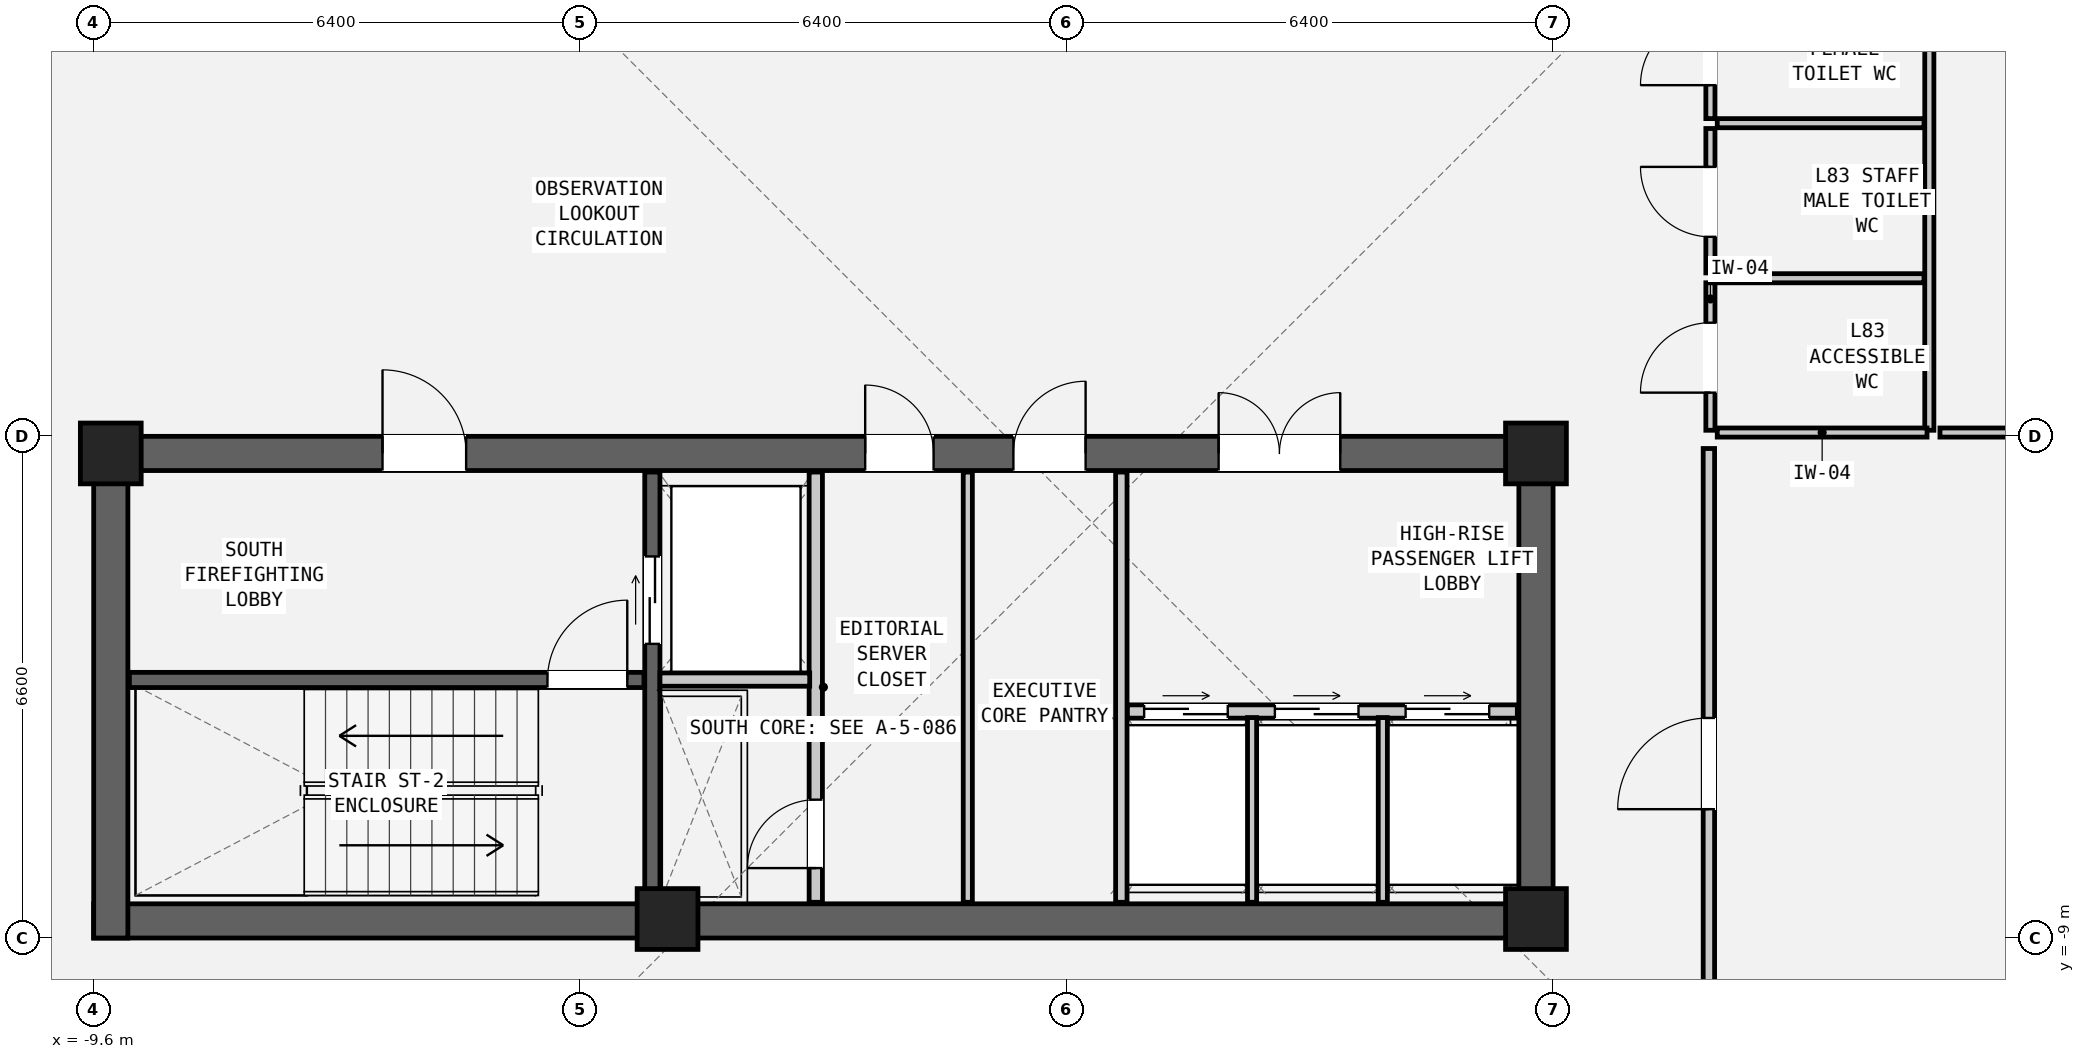
"""IFC4 building model, lengths in metres.
Left out: names, types, materials, properties, quantities, classifications, styles, units other than length and angle.
Written with IfcOpenShell. Run it as: python <this file> out.ifc"""

import sys

from ifc_helpers import new_model, si_unit, direction, frame, frame_2d, origin, origin_2d, place, context, subcontext, project, spatial, rectangle, extrude, element, fill, save


model = new_model("IFC4")
c1 = context("Model", 3, precision=1e-05, world=origin(), true_north=direction((0.0, 1.0)))
c2 = subcontext(c1, "Body", "Model", "MODEL_VIEW")
j1 = project(units=[si_unit("LENGTHUNIT", "METRE"), si_unit("PLANEANGLEUNIT", "RADIAN")], contexts=[c1])
p1 = place(None, origin())
s1 = spatial("IfcSite", under=j1, at=p1, CompositionType="ELEMENT")
p2 = place(p1, origin())
s2 = spatial("IfcBuilding", under=s1, at=p2, CompositionType="ELEMENT")
p3 = place(p2, frame((0.0, 0.0, 280.55)))
s3 = spatial("IfcBuildingStorey", under=s2, at=p3, CompositionType="ELEMENT", Elevation=280.55)
p4 = place(p3, frame((-9.6, -8.775, 0.0), z_axis=(0.0, 0.0, 1.0), x_axis=(1.0, 0.0, 0.0)))
e1 = element("IfcWall", 1, at=p4, inside=s3, PredefinedType="SHEAR", context=c2, shape_type="SweptSolid", body=[
    extrude(rectangle(XDim=19.2, YDim=0.45, at=frame_2d((9.6, 0.0))), origin(), (0.0, 0.0, 1.0), 4.35),
])
p5 = place(p3, frame((-9.6, -2.625, 0.0), z_axis=(0.0, 0.0, 1.0), x_axis=(1.0, 0.0, 0.0)))
e2 = element("IfcWall", 2, at=p5, inside=s3, PredefinedType="SHEAR", context=c2, shape_type="SweptSolid", body=[
    extrude(rectangle(XDim=19.2, YDim=0.45, at=frame_2d((9.6, 0.0))), origin(), (0.0, 0.0, 1.0), 4.35),
])
p6 = place(p5, frame((3.8, 0.0, 0.0)))
e3 = element("IfcOpeningElement", 3, at=p6, cuts=e2, PredefinedType="OPENING", context=c2, shape_type="SweptSolid", body=[
    extrude(rectangle(XDim=1.1, YDim=2.08, at=frame_2d((0.55, 1.04))), frame((0.0, 0.237, 0.0), z_axis=(0.0, -1.0, 0.0), x_axis=(1.0, 0.0, 0.0)), (0.0, 0.0, 1.0), 0.474),
])
p7 = place(p5, frame((10.15, 0.0, 0.0)))
e4 = element("IfcOpeningElement", 4, at=p7, cuts=e2, PredefinedType="OPENING", context=c2, shape_type="SweptSolid", body=[
    extrude(rectangle(XDim=0.9, YDim=2.05, at=frame_2d((0.45, 1.025))), frame((0.0, 0.237, 0.0), z_axis=(0.0, -1.0, 0.0), x_axis=(1.0, 0.0, 0.0)), (0.0, 0.0, 1.0), 0.474),
])
p8 = place(p5, frame((12.1, 0.0, 0.0)))
e5 = element("IfcOpeningElement", 5, at=p8, cuts=e2, PredefinedType="OPENING", context=c2, shape_type="SweptSolid", body=[
    extrude(rectangle(XDim=0.95, YDim=2.1, at=frame_2d((0.475, 1.05))), frame((0.0, 0.237, 0.0), z_axis=(0.0, -1.0, 0.0), x_axis=(1.0, 0.0, 0.0)), (0.0, 0.0, 1.0), 0.474),
])
p9 = place(p5, frame((14.8, 0.0, 0.0)))
e6 = element("IfcOpeningElement", 6, at=p9, cuts=e2, PredefinedType="OPENING", context=c2, shape_type="SweptSolid", body=[
    extrude(rectangle(XDim=1.6, YDim=2.12, at=frame_2d((0.8, 1.06))), frame((0.0, 0.237, 0.0), z_axis=(0.0, -1.0, 0.0), x_axis=(1.0, 0.0, 0.0)), (0.0, 0.0, 1.0), 0.474),
])
for number, where, z_axis, x_axis in (
    (7, (-9.375, -9.0, 0.0), (0.0, 0.0, 1.0), (0.0, 1.0, 0.0)),
    (8, (9.375, -9.0, 0.0), (0.0, 0.0, 1.0), (0.0, 1.0, 0.0)),
):
    element("IfcWall", number, at=place(p3, frame(where, z_axis=z_axis, x_axis=x_axis)), inside=s3, PredefinedType="SHEAR", context=c2, shape_type="SweptSolid", body=[
        extrude(rectangle(XDim=6.6, YDim=0.45, at=frame_2d((3.3, 0.0))), origin(), (0.0, 0.0, 1.0), 4.35),
    ])
for number, where, z_axis, x_axis in (
    (9, (-9.375, -2.625, 0.0), (0.0, 0.0, 1.0), (1.0, 0.0, 0.0)),
    (10, (9.375, -2.625, 0.0), (0.0, 0.0, 1.0), (1.0, 0.0, 0.0)),
    (11, (-2.05, -8.75, 0.0), (0.0, 0.0, 1.0), (1.0, 0.0, 0.0)),
    (12, (9.375, -8.75, 0.0), (0.0, 0.0, 1.0), (1.0, 0.0, 0.0)),
):
    element("IfcColumn", number, at=place(p3, frame(where, z_axis=z_axis, x_axis=x_axis)), inside=s3, PredefinedType="COLUMN", context=c2, shape_type="SweptSolid", body=[
        extrude(rectangle(XDim=0.8, YDim=0.8, at=origin_2d()), origin(), (0.0, 0.0, 1.0), 4.35),
    ])
p10 = place(p3, frame((-9.13, -5.605, 0.0), z_axis=(0.0, 0.0, 1.0), x_axis=(1.0, 0.0, 0.0)))
e13 = element("IfcWall", 13, at=p10, inside=s3, PredefinedType="SHEAR", context=c2, shape_type="SweptSolid", body=[
    extrude(rectangle(XDim=6.77, YDim=0.2, at=frame_2d((3.385, 0.0))), origin(), (0.0, 0.0, 1.0), 4.07),
])
p11 = place(p10, frame((5.5, 0.0, 0.0)))
e14 = element("IfcOpeningElement", 14, at=p11, cuts=e13, PredefinedType="OPENING", context=c2, shape_type="SweptSolid", body=[
    extrude(rectangle(XDim=1.05, YDim=2.08, at=frame_2d((0.525, 1.04))), frame((0.0, 0.112, 0.0), z_axis=(0.0, -1.0, 0.0), x_axis=(1.0, 0.0, 0.0)), (0.0, 0.0, 1.0), 0.224),
])
p12 = place(p3, frame((-2.25, -8.53, 0.0), z_axis=(0.0, 0.0, 1.0), x_axis=(0.0, 1.0, 0.0)))
e15 = element("IfcWall", 15, at=p12, inside=s3, PredefinedType="SHEAR", context=c2, shape_type="SweptSolid", body=[
    extrude(rectangle(XDim=5.66, YDim=0.2, at=frame_2d((2.83, 0.0))), origin(), (0.0, 0.0, 1.0), 4.07),
])
p13 = place(p12, frame((3.4, 0.0, 0.0)))
e16 = element("IfcOpeningElement", 16, at=p13, cuts=e15, PredefinedType="OPENING", context=c2, shape_type="SweptSolid", body=[
    extrude(rectangle(XDim=1.15, YDim=2.08, at=frame_2d((0.575, 1.04))), frame((0.0, 0.112, 0.0), z_axis=(0.0, -1.0, 0.0), x_axis=(1.0, 0.0, 0.0)), (0.0, 0.0, 1.0), 0.224),
])
p14 = place(p3, frame((-0.1, -8.53, 0.0), z_axis=(0.0, 0.0, 1.0), x_axis=(0.0, 1.0, 0.0)))
e17 = element("IfcWall", 17, at=p14, inside=s3, PredefinedType="PARTITIONING", context=c2, shape_type="SweptSolid", body=[
    extrude(rectangle(XDim=5.66, YDim=0.175, at=frame_2d((2.83, 0.0))), origin(), (0.0, 0.0, 1.0), 4.07),
])
p15 = place(p14, frame((0.45, 0.0, 0.0)))
e18 = element("IfcOpeningElement", 18, at=p15, cuts=e17, PredefinedType="OPENING", context=c2, shape_type="SweptSolid", body=[
    extrude(rectangle(XDim=0.9, YDim=2.05, at=frame_2d((0.45, 1.025))), frame((0.0, 0.1, 0.0), z_axis=(0.0, -1.0, 0.0), x_axis=(1.0, 0.0, 0.0)), (0.0, 0.0, 1.0), 0.199),
])
p16 = place(p3, frame((-2.15, -5.6, 0.0), z_axis=(0.0, 0.0, 1.0), x_axis=(1.0, 0.0, 0.0)))
e19 = element("IfcWall", 19, at=p16, inside=s3, PredefinedType="PARTITIONING", context=c2, shape_type="SweptSolid", body=[
    extrude(rectangle(XDim=1.97, YDim=0.175, at=frame_2d((0.985, 0.0))), origin(), (0.0, 0.0, 1.0), 4.07),
])
p17 = place(p3, frame((3.92, -8.53, 0.0), z_axis=(0.0, 0.0, 1.0), x_axis=(0.0, 1.0, 0.0)))
e20 = element("IfcWall", 20, at=p17, inside=s3, PredefinedType="PARTITIONING", context=c2, shape_type="SweptSolid", body=[
    extrude(rectangle(XDim=5.66, YDim=0.15, at=frame_2d((2.83, 0.0))), origin(), (0.0, 0.0, 1.0), 4.07),
])
p18 = place(p3, frame((1.9, -8.53, 0.0), z_axis=(0.0, 0.0, 1.0), x_axis=(0.0, 1.0, 0.0)))
e21 = element("IfcWall", 21, at=p18, inside=s3, PredefinedType="PARTITIONING", context=c2, shape_type="SweptSolid", body=[
    extrude(rectangle(XDim=5.66, YDim=0.12, at=frame_2d((2.83, 0.0))), origin(), (0.0, 0.0, 1.0), 4.07),
])
p19 = place(p3, frame((4.0, -6.02, 0.0), z_axis=(0.0, 0.0, 1.0), x_axis=(1.0, 0.0, 0.0)))
e22 = element("IfcWall", 22, at=p19, inside=s3, PredefinedType="PARTITIONING", context=c2, shape_type="SweptSolid", body=[
    extrude(rectangle(XDim=5.13, YDim=0.175, at=frame_2d((2.565, 0.0))), origin(), (0.0, 0.0, 1.0), 4.07),
])
p20 = place(p19, frame((0.22, 0.0, 0.0)))
e23 = element("IfcOpeningElement", 23, at=p20, cuts=e22, PredefinedType="OPENING", context=c2, shape_type="SweptSolid", body=[
    extrude(rectangle(XDim=1.1, YDim=2.06, at=frame_2d((0.55, 1.03))), frame((0.0, 0.1, 0.0), z_axis=(0.0, -1.0, 0.0), x_axis=(1.0, 0.0, 0.0)), (0.0, 0.0, 1.0), 0.199),
])
p21 = place(p19, frame((1.94, 0.0, 0.0)))
e24 = element("IfcOpeningElement", 24, at=p21, cuts=e22, PredefinedType="OPENING", context=c2, shape_type="SweptSolid", body=[
    extrude(rectangle(XDim=1.1, YDim=2.06, at=frame_2d((0.55, 1.03))), frame((0.0, 0.1, 0.0), z_axis=(0.0, -1.0, 0.0), x_axis=(1.0, 0.0, 0.0)), (0.0, 0.0, 1.0), 0.199),
])
p22 = place(p19, frame((3.66, 0.0, 0.0)))
e25 = element("IfcOpeningElement", 25, at=p22, cuts=e22, PredefinedType="OPENING", context=c2, shape_type="SweptSolid", body=[
    extrude(rectangle(XDim=1.1, YDim=2.06, at=frame_2d((0.55, 1.03))), frame((0.0, 0.1, 0.0), z_axis=(0.0, -1.0, 0.0), x_axis=(1.0, 0.0, 0.0)), (0.0, 0.0, 1.0), 0.199),
])
for number, where, z_axis, x_axis in (
    (26, (5.64, -8.53, 0.0), (0.0, 0.0, 1.0), (0.0, 1.0, 0.0)),
    (27, (7.36, -8.53, 0.0), (0.0, 0.0, 1.0), (0.0, 1.0, 0.0)),
):
    element("IfcWall", number, at=place(p3, frame(where, z_axis=z_axis, x_axis=x_axis)), inside=s3, PredefinedType="PARTITIONING", context=c2, shape_type="SweptSolid", body=[
        extrude(rectangle(XDim=2.43, YDim=0.12, at=frame_2d((1.215, 0.0))), origin(), (0.0, 0.0, 1.0), 4.07),
    ])
p23 = place(p3, frame((11.67, -2.32, 0.0), z_axis=(0.0, 0.0, 1.0), x_axis=(0.0, 1.0, 0.0)))
e28 = element("IfcWall", 28, at=p23, inside=s3, PredefinedType="PARTITIONING", context=c2, shape_type="SweptSolid", body=[
    extrude(rectangle(XDim=1.94, YDim=0.12, at=frame_2d((0.97, 0.0))), origin(), (0.0, 0.0, 1.0), 4.07),
])
p24 = place(p23, frame((0.495, 0.0, 0.0)))
e29 = element("IfcOpeningElement", 29, at=p24, cuts=e28, PredefinedType="OPENING", context=c2, shape_type="SweptSolid", body=[
    extrude(rectangle(XDim=0.92, YDim=2.1, at=frame_2d((0.46, 1.05))), frame((0.0, 0.072, 0.0), z_axis=(0.0, -1.0, 0.0), x_axis=(1.0, 0.0, 0.0)), (0.0, 0.0, 1.0), 0.144),
])
p25 = place(p3, frame((11.67, -0.25, 0.0), z_axis=(0.0, 0.0, 1.0), x_axis=(0.0, 1.0, 0.0)))
e30 = element("IfcWall", 30, at=p25, inside=s3, PredefinedType="PARTITIONING", context=c2, shape_type="SweptSolid", body=[
    extrude(rectangle(XDim=1.9, YDim=0.12, at=frame_2d((0.95, 0.0))), origin(), (0.0, 0.0, 1.0), 4.07),
])
p26 = place(p25, frame((0.475, 0.0, 0.0)))
e31 = element("IfcOpeningElement", 31, at=p26, cuts=e30, PredefinedType="OPENING", context=c2, shape_type="SweptSolid", body=[
    extrude(rectangle(XDim=0.92, YDim=2.1, at=frame_2d((0.46, 1.05))), frame((0.0, 0.072, 0.0), z_axis=(0.0, -1.0, 0.0), x_axis=(1.0, 0.0, 0.0)), (0.0, 0.0, 1.0), 0.144),
])
p27 = place(p3, frame((11.67, 1.78, 0.0), z_axis=(0.0, 0.0, 1.0), x_axis=(0.0, 1.0, 0.0)))
e32 = element("IfcWall", 32, at=p27, inside=s3, PredefinedType="PARTITIONING", context=c2, shape_type="SweptSolid", body=[
    extrude(rectangle(XDim=1.83, YDim=0.12, at=frame_2d((0.915, 0.0))), origin(), (0.0, 0.0, 1.0), 4.07),
])
p28 = place(p27, frame((0.44, 0.0, 0.0)))
e33 = element("IfcOpeningElement", 33, at=p28, cuts=e32, PredefinedType="OPENING", context=c2, shape_type="SweptSolid", body=[
    extrude(rectangle(XDim=0.92, YDim=2.1, at=frame_2d((0.46, 1.05))), frame((0.0, 0.072, 0.0), z_axis=(0.0, -1.0, 0.0), x_axis=(1.0, 0.0, 0.0)), (0.0, 0.0, 1.0), 0.144),
])
p29 = place(p3, frame((14.55, -2.32, 0.0), z_axis=(0.0, 0.0, 1.0), x_axis=(0.0, 1.0, 0.0)))
e34 = element("IfcWall", 34, at=p29, inside=s3, PredefinedType="PARTITIONING", context=c2, shape_type="SweptSolid", body=[
    extrude(rectangle(XDim=5.93, YDim=0.12, at=frame_2d((2.965, 0.0))), origin(), (0.0, 0.0, 1.0), 4.07),
])
p30 = place(p3, frame((11.76, -2.35, 0.0), z_axis=(0.0, 0.0, 1.0), x_axis=(1.0, 0.0, 0.0)))
e35 = element("IfcWall", 35, at=p30, inside=s3, PredefinedType="PARTITIONING", context=c2, shape_type="SweptSolid", body=[
    extrude(rectangle(XDim=2.76, YDim=0.12, at=frame_2d((1.38, 0.0))), origin(), (0.0, 0.0, 1.0), 2.25),
])
for number, where, z_axis, x_axis in (
    (36, (11.76, -0.32, 0.0), (0.0, 0.0, 1.0), (1.0, 0.0, 0.0)),
    (37, (11.76, 1.72, 0.0), (0.0, 0.0, 1.0), (1.0, 0.0, 0.0)),
):
    element("IfcWall", number, at=place(p3, frame(where, z_axis=z_axis, x_axis=x_axis)), inside=s3, PredefinedType="PARTITIONING", context=c2, shape_type="SweptSolid", body=[
        extrude(rectangle(XDim=2.72, YDim=0.12, at=frame_2d((1.36, 0.0))), origin(), (0.0, 0.0, 1.0), 4.07),
    ])
p31 = place(p3, frame((14.69, -2.35, 0.0), z_axis=(0.0, 0.0, 1.0), x_axis=(1.0, 0.0, 0.0)))
e38 = element("IfcWall", 38, at=p31, inside=s3, PredefinedType="PARTITIONING", context=c2, shape_type="SweptSolid", body=[
    extrude(rectangle(XDim=6.927, YDim=0.12, at=frame_2d((3.464, 0.0))), origin(), (0.0, 0.0, 1.0), 2.25),
])
p32 = place(p3, frame((11.65, -10.85, 0.0), z_axis=(0.0, 0.0, 1.0), x_axis=(0.0, 1.0, 0.0)))
e39 = element("IfcWall", 39, at=p32, inside=s3, PredefinedType="PARTITIONING", context=c2, shape_type="SweptSolid", body=[
    extrude(rectangle(XDim=8.29, YDim=0.15, at=frame_2d((4.145, 0.0))), origin(), (0.0, 0.0, 1.0), 4.07),
])
p33 = place(p32, frame((3.545, 0.0, 0.0)))
e40 = element("IfcOpeningElement", 40, at=p33, cuts=e39, PredefinedType="OPENING", context=c2, shape_type="SweptSolid", body=[
    extrude(rectangle(XDim=1.2, YDim=2.1, at=frame_2d((0.6, 1.05))), frame((0.0, 0.087, 0.0), z_axis=(0.0, -1.0, 0.0), x_axis=(1.0, 0.0, 0.0)), (0.0, 0.0, 1.0), 0.174),
])
p34 = place(p11, origin())
e41 = element("IfcDoor", 41, at=p34, inside=s3, OperationType="SINGLE_SWING_RIGHT", PredefinedType="DOOR", context=c2, shape_type="SweptSolid", body=[
    extrude(rectangle(XDim=1.05, YDim=2.08, at=frame_2d((0.525, 1.04))), frame((0.0, 0.025, 0.0), z_axis=(0.0, -1.0, 0.0), x_axis=(1.0, 0.0, 0.0)), (0.0, 0.0, 1.0), 0.05),
])
fill(e14, e41)
p35 = place(p6, origin())
e42 = element("IfcDoor", 42, at=p35, inside=s3, OperationType="SINGLE_SWING_LEFT", PredefinedType="DOOR", context=c2, shape_type="SweptSolid", body=[
    extrude(rectangle(XDim=1.1, YDim=2.08, at=frame_2d((0.55, 1.04))), frame((0.0, 0.025, 0.0), z_axis=(0.0, -1.0, 0.0), x_axis=(1.0, 0.0, 0.0)), (0.0, 0.0, 1.0), 0.05),
])
fill(e3, e42)
p36 = place(p13, origin())
e43 = element("IfcDoor", 43, at=p36, inside=s3, OperationType="DOUBLE_DOOR_SLIDING", PredefinedType="DOOR", context=c2, shape_type="SweptSolid", body=[
    extrude(rectangle(XDim=1.15, YDim=2.08, at=frame_2d((0.575, 1.04))), frame((0.0, 0.025, 0.0), z_axis=(0.0, -1.0, 0.0), x_axis=(1.0, 0.0, 0.0)), (0.0, 0.0, 1.0), 0.05),
])
fill(e16, e43)
p37 = place(p15, origin())
e44 = element("IfcDoor", 44, at=p37, inside=s3, OperationType="SINGLE_SWING_LEFT", PredefinedType="DOOR", context=c2, shape_type="SweptSolid", body=[
    extrude(rectangle(XDim=0.9, YDim=2.05, at=frame_2d((0.45, 1.025))), frame((0.0, 0.025, 0.0), z_axis=(0.0, -1.0, 0.0), x_axis=(1.0, 0.0, 0.0)), (0.0, 0.0, 1.0), 0.05),
])
fill(e18, e44)
p38 = place(p7, origin())
e45 = element("IfcDoor", 45, at=p38, inside=s3, OperationType="SINGLE_SWING_LEFT", PredefinedType="DOOR", context=c2, shape_type="SweptSolid", body=[
    extrude(rectangle(XDim=0.9, YDim=2.05, at=frame_2d((0.45, 1.025))), frame((0.0, 0.025, 0.0), z_axis=(0.0, -1.0, 0.0), x_axis=(1.0, 0.0, 0.0)), (0.0, 0.0, 1.0), 0.05),
])
fill(e4, e45)
p39 = place(p8, origin())
e46 = element("IfcDoor", 46, at=p39, inside=s3, OperationType="SINGLE_SWING_RIGHT", PredefinedType="DOOR", context=c2, shape_type="SweptSolid", body=[
    extrude(rectangle(XDim=0.95, YDim=2.1, at=frame_2d((0.475, 1.05))), frame((0.0, 0.025, 0.0), z_axis=(0.0, -1.0, 0.0), x_axis=(1.0, 0.0, 0.0)), (0.0, 0.0, 1.0), 0.05),
])
fill(e5, e46)
p40 = place(p20, origin())
e47 = element("IfcDoor", 47, at=p40, inside=s3, OperationType="DOUBLE_DOOR_SLIDING", PredefinedType="DOOR", context=c2, shape_type="SweptSolid", body=[
    extrude(rectangle(XDim=1.1, YDim=2.06, at=frame_2d((0.55, 1.03))), frame((0.0, 0.025, 0.0), z_axis=(0.0, -1.0, 0.0), x_axis=(1.0, 0.0, 0.0)), (0.0, 0.0, 1.0), 0.05),
])
fill(e23, e47)
p41 = place(p21, origin())
e48 = element("IfcDoor", 48, at=p41, inside=s3, OperationType="DOUBLE_DOOR_SLIDING", PredefinedType="DOOR", context=c2, shape_type="SweptSolid", body=[
    extrude(rectangle(XDim=1.1, YDim=2.06, at=frame_2d((0.55, 1.03))), frame((0.0, 0.025, 0.0), z_axis=(0.0, -1.0, 0.0), x_axis=(1.0, 0.0, 0.0)), (0.0, 0.0, 1.0), 0.05),
])
fill(e24, e48)
p42 = place(p22, origin())
e49 = element("IfcDoor", 49, at=p42, inside=s3, OperationType="DOUBLE_DOOR_SLIDING", PredefinedType="DOOR", context=c2, shape_type="SweptSolid", body=[
    extrude(rectangle(XDim=1.1, YDim=2.06, at=frame_2d((0.55, 1.03))), frame((0.0, 0.025, 0.0), z_axis=(0.0, -1.0, 0.0), x_axis=(1.0, 0.0, 0.0)), (0.0, 0.0, 1.0), 0.05),
])
fill(e25, e49)
p43 = place(p9, origin())
e50 = element("IfcDoor", 50, at=p43, inside=s3, OperationType="DOUBLE_DOOR_SINGLE_SWING", PredefinedType="DOOR", context=c2, shape_type="SweptSolid", body=[
    extrude(rectangle(XDim=1.6, YDim=2.12, at=frame_2d((0.8, 1.06))), frame((0.0, 0.025, 0.0), z_axis=(0.0, -1.0, 0.0), x_axis=(1.0, 0.0, 0.0)), (0.0, 0.0, 1.0), 0.05),
])
fill(e6, e50)
p44 = place(p24, origin())
e51 = element("IfcDoor", 51, at=p44, inside=s3, OperationType="SINGLE_SWING_LEFT", PredefinedType="DOOR", context=c2, shape_type="SweptSolid", body=[
    extrude(rectangle(XDim=0.92, YDim=2.1, at=frame_2d((0.46, 1.05))), frame((0.0, 0.025, 0.0), z_axis=(0.0, -1.0, 0.0), x_axis=(1.0, 0.0, 0.0)), (0.0, 0.0, 1.0), 0.05),
])
fill(e29, e51)
p45 = place(p26, origin())
e52 = element("IfcDoor", 52, at=p45, inside=s3, OperationType="SINGLE_SWING_RIGHT", PredefinedType="DOOR", context=c2, shape_type="SweptSolid", body=[
    extrude(rectangle(XDim=0.92, YDim=2.1, at=frame_2d((0.46, 1.05))), frame((0.0, 0.025, 0.0), z_axis=(0.0, -1.0, 0.0), x_axis=(1.0, 0.0, 0.0)), (0.0, 0.0, 1.0), 0.05),
])
fill(e31, e52)
p46 = place(p28, origin())
e53 = element("IfcDoor", 53, at=p46, inside=s3, OperationType="SINGLE_SWING_LEFT", PredefinedType="DOOR", context=c2, shape_type="SweptSolid", body=[
    extrude(rectangle(XDim=0.92, YDim=2.1, at=frame_2d((0.46, 1.05))), frame((0.0, 0.025, 0.0), z_axis=(0.0, -1.0, 0.0), x_axis=(1.0, 0.0, 0.0)), (0.0, 0.0, 1.0), 0.05),
])
fill(e33, e53)
p47 = place(p33, origin())
e54 = element("IfcDoor", 54, at=p47, inside=s3, OperationType="SINGLE_SWING_LEFT", PredefinedType="DOOR", context=c2, shape_type="SweptSolid", body=[
    extrude(rectangle(XDim=1.2, YDim=2.1, at=frame_2d((0.6, 1.05))), frame((0.0, 0.025, 0.0), z_axis=(0.0, -1.0, 0.0), x_axis=(1.0, 0.0, 0.0)), (0.0, 0.0, 1.0), 0.05),
])
fill(e40, e54)
save(model, sys.argv[1])
